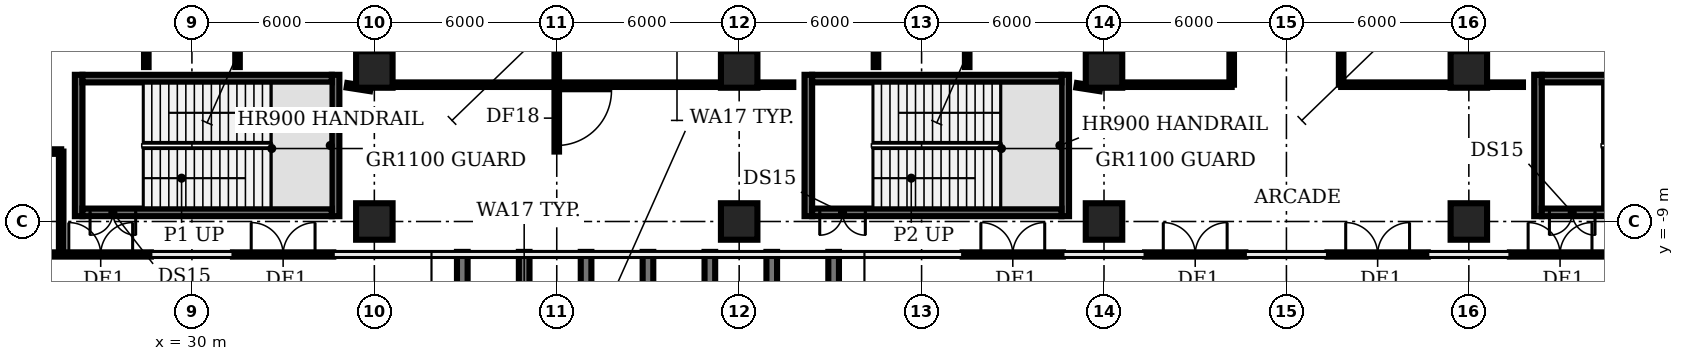
"""IFC4 building model, lengths in metres.
Left out: names, types, materials, properties, quantities, classifications, styles, units other than length and angle.
Written with IfcOpenShell. Run it as: python <this file> out.ifc"""

import sys

from ifc_helpers import new_model, si_unit, direction, frame, frame_2d, origin, origin_2d, place, context, subcontext, project, spatial, polyline, rectangle, outline, extrude, element, fill, save


model = new_model("IFC4")
c1 = context("Model", 3, precision=1e-05, world=origin(), true_north=direction((0.0, 1.0)))
c2 = subcontext(c1, "Body", "Model", "MODEL_VIEW")
j1 = project(units=[si_unit("LENGTHUNIT", "METRE"), si_unit("PLANEANGLEUNIT", "RADIAN")], contexts=[c1])
p1 = place(None, origin())
s1 = spatial("IfcSite", under=j1, at=p1, CompositionType="ELEMENT")
p2 = place(p1, origin())
s2 = spatial("IfcBuilding", under=s1, at=p2, CompositionType="ELEMENT")
p3 = place(p2, origin())
s3 = spatial("IfcBuildingStorey", under=s2, at=p3, CompositionType="ELEMENT", Elevation=0.0)
for number, where, z_axis, x_axis in (
    (1, (36.0, -9.0, 0.0), (0.0, 0.0, 1.0), (1.0, 0.0, 0.0)),
    (2, (36.0, -4.0, 0.0), (0.0, 0.0, 1.0), (1.0, 0.0, 0.0)),
    (3, (48.0, -9.0, 0.0), (0.0, 0.0, 1.0), (1.0, 0.0, 0.0)),
    (4, (48.0, -4.0, 0.0), (0.0, 0.0, 1.0), (1.0, 0.0, 0.0)),
    (5, (60.0, -9.0, 0.0), (0.0, 0.0, 1.0), (1.0, 0.0, 0.0)),
    (6, (60.0, -4.0, 0.0), (0.0, 0.0, 1.0), (1.0, 0.0, 0.0)),
    (7, (72.0, -9.0, 0.0), (0.0, 0.0, 1.0), (1.0, 0.0, 0.0)),
    (8, (72.0, -4.0, 0.0), (0.0, 0.0, 1.0), (1.0, 0.0, 0.0)),
):
    element("IfcColumn", number, at=place(p3, frame(where, z_axis=z_axis, x_axis=x_axis)), inside=s3, PredefinedType="COLUMN", context=c2, shape_type="SweptSolid", body=[
        extrude(rectangle(XDim=1.2, YDim=1.2, at=origin_2d()), origin(), (0.0, 0.0, 1.0), 5.65),
    ])
for number, where, z_axis, x_axis in (
    (9, (38.893, -16.7, 0.0), (0.0, 0.0, 1.0), (0.0, 1.0, 0.0)),
    (10, (40.929, -16.7, 0.0), (0.0, 0.0, 1.0), (0.0, 1.0, 0.0)),
    (11, (42.964, -16.7, 0.0), (0.0, 0.0, 1.0), (0.0, 1.0, 0.0)),
    (12, (45.0, -16.7, 0.0), (0.0, 0.0, 1.0), (0.0, 1.0, 0.0)),
    (13, (47.036, -16.7, 0.0), (0.0, 0.0, 1.0), (0.0, 1.0, 0.0)),
    (14, (49.071, -16.7, 0.0), (0.0, 0.0, 1.0), (0.0, 1.0, 0.0)),
    (15, (51.107, -16.7, 0.0), (0.0, 0.0, 1.0), (0.0, 1.0, 0.0)),
):
    element("IfcWall", number, at=place(p3, frame(where, z_axis=z_axis, x_axis=x_axis)), inside=s3, PredefinedType="SOLIDWALL", context=c2, shape_type="SweptSolid", body=[
        extrude(outline(polyline([(0.0, 0.0), (6.7, 0.0), (6.7, 10.647), (4.9, 10.647), (1.293, 8.5), (1.0, 8.5), (1.0, 8.147), (0.0, 8.147), (0.0, 0.0)])), frame((0.0, 0.175, 0.0), z_axis=(0.0, -1.0, 0.0), x_axis=(1.0, 0.0, 0.0)), (0.0, 0.0, 1.0), 0.35),
    ])
p4 = place(p3, frame((25.35, -10.085, 0.0), z_axis=(0.0, 0.0, 1.0), x_axis=(1.0, 0.0, 0.0)))
e16 = element("IfcWall", 16, at=p4, inside=s3, PredefinedType="SOLIDWALL", context=c2, shape_type="SweptSolid", body=[
    extrude(rectangle(XDim=3.3, YDim=0.14, at=frame_2d((1.65, 0.0))), origin(), (0.0, 0.0, 1.0), 5.65),
])
p5 = place(p4, frame((0.6, 0.0, 0.0)))
e17 = element("IfcOpeningElement", 17, at=p5, cuts=e16, PredefinedType="OPENING", context=c2, shape_type="SweptSolid", body=[
    extrude(rectangle(XDim=2.1, YDim=2.4, at=frame_2d((1.05, 1.2))), frame((0.0, 0.08, 0.0), z_axis=(0.0, -1.0, 0.0), x_axis=(1.0, 0.0, 0.0)), (0.0, 0.0, 1.0), 0.16),
])
p6 = place(p3, frame((31.35, -10.085, 0.0), z_axis=(0.0, 0.0, 1.0), x_axis=(1.0, 0.0, 0.0)))
e18 = element("IfcWall", 18, at=p6, inside=s3, PredefinedType="SOLIDWALL", context=c2, shape_type="SweptSolid", body=[
    extrude(rectangle(XDim=3.3, YDim=0.14, at=frame_2d((1.65, 0.0))), origin(), (0.0, 0.0, 1.0), 5.65),
])
p7 = place(p6, frame((0.6, 0.0, 0.0)))
e19 = element("IfcOpeningElement", 19, at=p7, cuts=e18, PredefinedType="OPENING", context=c2, shape_type="SweptSolid", body=[
    extrude(rectangle(XDim=2.1, YDim=2.4, at=frame_2d((1.05, 1.2))), frame((0.0, 0.08, 0.0), z_axis=(0.0, -1.0, 0.0), x_axis=(1.0, 0.0, 0.0)), (0.0, 0.0, 1.0), 0.16),
])
p8 = place(p3, frame((55.35, -10.085, 0.0), z_axis=(0.0, 0.0, 1.0), x_axis=(1.0, 0.0, 0.0)))
e20 = element("IfcWall", 20, at=p8, inside=s3, PredefinedType="SOLIDWALL", context=c2, shape_type="SweptSolid", body=[
    extrude(rectangle(XDim=3.3, YDim=0.14, at=frame_2d((1.65, 0.0))), origin(), (0.0, 0.0, 1.0), 5.65),
])
p9 = place(p8, frame((0.6, 0.0, 0.0)))
e21 = element("IfcOpeningElement", 21, at=p9, cuts=e20, PredefinedType="OPENING", context=c2, shape_type="SweptSolid", body=[
    extrude(rectangle(XDim=2.1, YDim=2.4, at=frame_2d((1.05, 1.2))), frame((0.0, 0.08, 0.0), z_axis=(0.0, -1.0, 0.0), x_axis=(1.0, 0.0, 0.0)), (0.0, 0.0, 1.0), 0.16),
])
p10 = place(p3, frame((61.35, -10.085, 0.0), z_axis=(0.0, 0.0, 1.0), x_axis=(1.0, 0.0, 0.0)))
e22 = element("IfcWall", 22, at=p10, inside=s3, PredefinedType="SOLIDWALL", context=c2, shape_type="SweptSolid", body=[
    extrude(rectangle(XDim=3.3, YDim=0.14, at=frame_2d((1.65, 0.0))), origin(), (0.0, 0.0, 1.0), 5.65),
])
p11 = place(p10, frame((0.6, 0.0, 0.0)))
e23 = element("IfcOpeningElement", 23, at=p11, cuts=e22, PredefinedType="OPENING", context=c2, shape_type="SweptSolid", body=[
    extrude(rectangle(XDim=2.1, YDim=2.4, at=frame_2d((1.05, 1.2))), frame((0.0, 0.08, 0.0), z_axis=(0.0, -1.0, 0.0), x_axis=(1.0, 0.0, 0.0)), (0.0, 0.0, 1.0), 0.16),
])
p12 = place(p3, frame((67.35, -10.085, 0.0), z_axis=(0.0, 0.0, 1.0), x_axis=(1.0, 0.0, 0.0)))
e24 = element("IfcWall", 24, at=p12, inside=s3, PredefinedType="SOLIDWALL", context=c2, shape_type="SweptSolid", body=[
    extrude(rectangle(XDim=3.3, YDim=0.14, at=frame_2d((1.65, 0.0))), origin(), (0.0, 0.0, 1.0), 5.65),
])
p13 = place(p12, frame((0.6, 0.0, 0.0)))
e25 = element("IfcOpeningElement", 25, at=p13, cuts=e24, PredefinedType="OPENING", context=c2, shape_type="SweptSolid", body=[
    extrude(rectangle(XDim=2.1, YDim=2.4, at=frame_2d((1.05, 1.2))), frame((0.0, 0.08, 0.0), z_axis=(0.0, -1.0, 0.0), x_axis=(1.0, 0.0, 0.0)), (0.0, 0.0, 1.0), 0.16),
])
p14 = place(p3, frame((73.35, -10.085, 0.0), z_axis=(0.0, 0.0, 1.0), x_axis=(1.0, 0.0, 0.0)))
e26 = element("IfcWall", 26, at=p14, inside=s3, PredefinedType="SOLIDWALL", context=c2, shape_type="SweptSolid", body=[
    extrude(rectangle(XDim=3.3, YDim=0.14, at=frame_2d((1.65, 0.0))), origin(), (0.0, 0.0, 1.0), 5.65),
])
p15 = place(p14, frame((0.6, 0.0, 0.0)))
e27 = element("IfcOpeningElement", 27, at=p15, cuts=e26, PredefinedType="OPENING", context=c2, shape_type="SweptSolid", body=[
    extrude(rectangle(XDim=2.1, YDim=2.4, at=frame_2d((1.05, 1.2))), frame((0.0, 0.08, 0.0), z_axis=(0.0, -1.0, 0.0), x_axis=(1.0, 0.0, 0.0)), (0.0, 0.0, 1.0), 0.16),
])
for number, where, z_axis, x_axis in (
    (28, (26.275, -8.825, 0.0), (0.0, 0.0, 1.0), (0.0, 1.0, 0.0)),
    (29, (34.725, -8.825, 0.0), (0.0, 0.0, 1.0), (0.0, 1.0, 0.0)),
):
    element("IfcWall", number, at=place(p3, frame(where, z_axis=z_axis, x_axis=x_axis)), inside=s3, PredefinedType="SHEAR", context=c2, shape_type="SweptSolid", body=[
        extrude(rectangle(XDim=4.65, YDim=0.25, at=frame_2d((2.325, 0.0))), origin(), (0.0, 0.0, 1.0), 5.65),
    ])
p16 = place(p3, frame((34.6, -8.7, 0.0), z_axis=(0.0, 0.0, 1.0), x_axis=(-1.0, 0.0, 0.0)))
e30 = element("IfcWall", 30, at=p16, inside=s3, PredefinedType="SHEAR", context=c2, shape_type="SweptSolid", body=[
    extrude(rectangle(XDim=8.2, YDim=0.25, at=frame_2d((4.1, 0.0))), origin(), (0.0, 0.0, 1.0), 5.65),
])
p17 = place(p16, frame((6.45, 0.0, 0.0)))
e31 = element("IfcOpeningElement", 31, at=p17, cuts=e30, PredefinedType="OPENING", context=c2, shape_type="SweptSolid", body=[
    extrude(rectangle(XDim=1.5, YDim=2.1, at=frame_2d((0.75, 1.05))), frame((0.0, 0.135, 0.0), z_axis=(0.0, -1.0, 0.0), x_axis=(1.0, 0.0, 0.0)), (0.0, 0.0, 1.0), 0.27),
])
p18 = place(p3, frame((26.4, -4.3, 0.0), z_axis=(0.0, 0.0, 1.0), x_axis=(1.0, 0.0, 0.0)))
e32 = element("IfcWall", 32, at=p18, inside=s3, PredefinedType="SHEAR", context=c2, shape_type="SweptSolid", body=[
    extrude(rectangle(XDim=8.2, YDim=0.25, at=frame_2d((4.1, 0.0))), origin(), (0.0, 0.0, 1.0), 5.65),
])
for number, where, z_axis, x_axis in (
    (33, (50.275, -8.825, 0.0), (0.0, 0.0, 1.0), (0.0, 1.0, 0.0)),
    (34, (58.725, -8.825, 0.0), (0.0, 0.0, 1.0), (0.0, 1.0, 0.0)),
):
    element("IfcWall", number, at=place(p3, frame(where, z_axis=z_axis, x_axis=x_axis)), inside=s3, PredefinedType="SHEAR", context=c2, shape_type="SweptSolid", body=[
        extrude(rectangle(XDim=4.65, YDim=0.25, at=frame_2d((2.325, 0.0))), origin(), (0.0, 0.0, 1.0), 5.65),
    ])
p19 = place(p3, frame((58.6, -8.7, 0.0), z_axis=(0.0, 0.0, 1.0), x_axis=(-1.0, 0.0, 0.0)))
e35 = element("IfcWall", 35, at=p19, inside=s3, PredefinedType="SHEAR", context=c2, shape_type="SweptSolid", body=[
    extrude(rectangle(XDim=8.2, YDim=0.25, at=frame_2d((4.1, 0.0))), origin(), (0.0, 0.0, 1.0), 5.65),
])
p20 = place(p19, frame((6.45, 0.0, 0.0)))
e36 = element("IfcOpeningElement", 36, at=p20, cuts=e35, PredefinedType="OPENING", context=c2, shape_type="SweptSolid", body=[
    extrude(rectangle(XDim=1.5, YDim=2.1, at=frame_2d((0.75, 1.05))), frame((0.0, 0.135, 0.0), z_axis=(0.0, -1.0, 0.0), x_axis=(1.0, 0.0, 0.0)), (0.0, 0.0, 1.0), 0.27),
])
p21 = place(p3, frame((50.4, -4.3, 0.0), z_axis=(0.0, 0.0, 1.0), x_axis=(1.0, 0.0, 0.0)))
e37 = element("IfcWall", 37, at=p21, inside=s3, PredefinedType="SHEAR", context=c2, shape_type="SweptSolid", body=[
    extrude(rectangle(XDim=8.2, YDim=0.25, at=frame_2d((4.1, 0.0))), origin(), (0.0, 0.0, 1.0), 5.65),
])
p22 = place(p3, frame((74.275, -8.825, 0.0), z_axis=(0.0, 0.0, 1.0), x_axis=(0.0, 1.0, 0.0)))
e38 = element("IfcWall", 38, at=p22, inside=s3, PredefinedType="SHEAR", context=c2, shape_type="SweptSolid", body=[
    extrude(rectangle(XDim=4.65, YDim=0.25, at=frame_2d((2.325, 0.0))), origin(), (0.0, 0.0, 1.0), 5.65),
])
p23 = place(p3, frame((82.6, -8.7, 0.0), z_axis=(0.0, 0.0, 1.0), x_axis=(-1.0, 0.0, 0.0)))
e39 = element("IfcWall", 39, at=p23, inside=s3, PredefinedType="SHEAR", context=c2, shape_type="SweptSolid", body=[
    extrude(rectangle(XDim=8.2, YDim=0.25, at=frame_2d((4.1, 0.0))), origin(), (0.0, 0.0, 1.0), 5.65),
])
p24 = place(p23, frame((6.45, 0.0, 0.0)))
e40 = element("IfcOpeningElement", 40, at=p24, cuts=e39, PredefinedType="OPENING", context=c2, shape_type="SweptSolid", body=[
    extrude(rectangle(XDim=1.5, YDim=2.1, at=frame_2d((0.75, 1.05))), frame((0.0, 0.135, 0.0), z_axis=(0.0, -1.0, 0.0), x_axis=(1.0, 0.0, 0.0)), (0.0, 0.0, 1.0), 0.27),
])
p25 = place(p3, frame((74.4, -4.3, 0.0), z_axis=(0.0, 0.0, 1.0), x_axis=(1.0, 0.0, 0.0)))
e41 = element("IfcWall", 41, at=p25, inside=s3, PredefinedType="SHEAR", context=c2, shape_type="SweptSolid", body=[
    extrude(rectangle(XDim=8.2, YDim=0.25, at=frame_2d((4.1, 0.0))), origin(), (0.0, 0.0, 1.0), 5.65),
])
p26 = place(p3, frame((23.43, -6.7, 0.0), z_axis=(0.0, 0.0, 1.0), x_axis=(1.0, 0.0, 0.0)))
e42 = element("IfcWall", 42, at=p26, inside=s3, PredefinedType="PARTITIONING", context=c2, shape_type="SweptSolid", body=[
    extrude(rectangle(XDim=2.27, YDim=0.15, at=frame_2d((1.135, 0.0))), origin(), (0.0, 0.0, 1.0), 4.53),
])
p27 = place(p3, frame((25.7, -10.03, 0.0), z_axis=(0.0, 0.0, 1.0), x_axis=(0.0, 1.0, 0.0)))
e43 = element("IfcWall", 43, at=p27, inside=s3, PredefinedType="PARTITIONING", context=c2, shape_type="SweptSolid", body=[
    extrude(rectangle(XDim=3.33, YDim=0.15, at=frame_2d((1.665, 0.0))), origin(), (0.0, 0.0, 1.0), 4.53),
])
p28 = place(p3, frame((28.5, -3.92, 0.0), z_axis=(0.0, 0.0, 1.0), x_axis=(0.0, 1.0, 0.0)))
e44 = element("IfcWall", 44, at=p28, inside=s3, PredefinedType="PARTITIONING", context=c2, shape_type="SweptSolid", body=[
    extrude(rectangle(XDim=4.74, YDim=0.15, at=frame_2d((2.37, 0.0))), origin(), (0.0, 0.0, 1.0), 4.53),
])
p29 = place(p28, frame((1.84, 0.0, 0.0)))
e45 = element("IfcOpeningElement", 45, at=p29, cuts=e44, PredefinedType="OPENING", context=c2, shape_type="SweptSolid", body=[
    extrude(rectangle(XDim=1.2, YDim=2.1, at=frame_2d((0.6, 1.05))), frame((0.0, 0.085, 0.0), z_axis=(0.0, -1.0, 0.0), x_axis=(1.0, 0.0, 0.0)), (0.0, 0.0, 1.0), 0.17),
])
p30 = place(p3, frame((31.5, 19.52, 0.0), z_axis=(0.0, 0.0, 1.0), x_axis=(0.0, -1.0, 0.0)))
e46 = element("IfcWall", 46, at=p30, inside=s3, PredefinedType="PARTITIONING", context=c2, shape_type="SweptSolid", body=[
    extrude(rectangle(XDim=23.44, YDim=0.15, at=frame_2d((11.72, 0.0))), origin(), (0.0, 0.0, 1.0), 4.53),
])
p31 = place(p30, frame((11.14, 0.0, 0.0)))
e47 = element("IfcOpeningElement", 47, at=p31, cuts=e46, PredefinedType="OPENING", context=c2, shape_type="SweptSolid", body=[
    extrude(rectangle(XDim=1.0, YDim=2.1, at=frame_2d((0.5, 1.05))), frame((0.0, 0.085, 0.0), z_axis=(0.0, -1.0, 0.0), x_axis=(1.0, 0.0, 0.0)), (0.0, 0.0, 1.0), 0.17),
])
p32 = place(p3, frame((35.1, -4.52, 0.0), z_axis=(0.0, 0.0, 1.0), x_axis=(0.988098486873, -0.153822560892, 0.0)))
e48 = element("IfcWall", 48, at=p32, inside=s3, PredefinedType="PARTITIONING", context=c2, shape_type="SweptSolid", body=[
    extrude(rectangle(XDim=0.779, YDim=0.15, at=frame_2d((0.39, 0.0))), origin(), (0.0, 0.0, 1.0), 4.53),
])
p33 = place(p3, frame((36.46, -4.5, 0.0), z_axis=(0.0, 0.0, 1.0), x_axis=(1.0, 0.0, 0.0)))
e49 = element("IfcWall", 49, at=p33, inside=s3, PredefinedType="PARTITIONING", context=c2, shape_type="SweptSolid", body=[
    extrude(rectangle(XDim=11.08, YDim=0.15, at=frame_2d((5.54, 0.0))), origin(), (0.0, 0.0, 1.0), 4.53),
])
p34 = place(p3, frame((42.0, -4.5, 0.0), z_axis=(0.0, 0.0, 1.0), x_axis=(0.0, -1.0, 0.0)))
e50 = element("IfcWall", 50, at=p34, inside=s3, PredefinedType="PARTITIONING", context=c2, shape_type="SweptSolid", body=[
    extrude(rectangle(XDim=2.2, YDim=0.15, at=frame_2d((1.1, 0.0))), origin(), (0.0, 0.0, 1.0), 4.53),
])
p35 = place(p34, frame((0.2, 0.0, 0.0)))
e51 = element("IfcOpeningElement", 51, at=p35, cuts=e50, PredefinedType="OPENING", context=c2, shape_type="SweptSolid", body=[
    extrude(rectangle(XDim=1.8, YDim=2.1, at=frame_2d((0.9, 1.05))), frame((0.0, 0.085, 0.0), z_axis=(0.0, -1.0, 0.0), x_axis=(1.0, 0.0, 0.0)), (0.0, 0.0, 1.0), 0.17),
])
p36 = place(p3, frame((42.0, -4.5, 0.0), z_axis=(0.0, 0.0, 1.0), x_axis=(0.0, 1.0, 0.0)))
e52 = element("IfcWall", 52, at=p36, inside=s3, PredefinedType="PARTITIONING", context=c2, shape_type="SweptSolid", body=[
    extrude(rectangle(XDim=32.4, YDim=0.15, at=frame_2d((16.2, 0.0))), origin(), (0.0, 0.0, 1.0), 4.53),
])
p37 = place(p3, frame((48.46, -4.5, 0.0), z_axis=(0.0, 0.0, 1.0), x_axis=(1.0, 0.0, 0.0)))
e53 = element("IfcWall", 53, at=p37, inside=s3, PredefinedType="PARTITIONING", context=c2, shape_type="SweptSolid", body=[
    extrude(rectangle(XDim=1.32, YDim=0.15, at=frame_2d((0.66, 0.0))), origin(), (0.0, 0.0, 1.0), 4.53),
])
p38 = place(p3, frame((52.5, 27.9, 0.0), z_axis=(0.0, 0.0, 1.0), x_axis=(0.0, -1.0, 0.0)))
e54 = element("IfcWall", 54, at=p38, inside=s3, PredefinedType="PARTITIONING", context=c2, shape_type="SweptSolid", body=[
    extrude(rectangle(XDim=31.82, YDim=0.15, at=frame_2d((15.91, 0.0))), origin(), (0.0, 0.0, 1.0), 4.53),
])
p39 = place(p38, frame((14.9, 0.0, 0.0)))
e55 = element("IfcOpeningElement", 55, at=p39, cuts=e54, PredefinedType="OPENING", context=c2, shape_type="SweptSolid", body=[
    extrude(rectangle(XDim=1.8, YDim=2.1, at=frame_2d((0.9, 1.05))), frame((0.0, 0.085, 0.0), z_axis=(0.0, -1.0, 0.0), x_axis=(1.0, 0.0, 0.0)), (0.0, 0.0, 1.0), 0.17),
])
p40 = place(p3, frame((55.5, 6.57, 0.0), z_axis=(0.0, 0.0, 1.0), x_axis=(0.0, -1.0, 0.0)))
e56 = element("IfcWall", 56, at=p40, inside=s3, PredefinedType="PARTITIONING", context=c2, shape_type="SweptSolid", body=[
    extrude(rectangle(XDim=10.49, YDim=0.15, at=frame_2d((5.245, 0.0))), origin(), (0.0, 0.0, 1.0), 4.53),
])
p41 = place(p40, frame((4.59, 0.0, 0.0)))
e57 = element("IfcOpeningElement", 57, at=p41, cuts=e56, PredefinedType="OPENING", context=c2, shape_type="SweptSolid", body=[
    extrude(rectangle(XDim=1.2, YDim=2.1, at=frame_2d((0.6, 1.05))), frame((0.0, 0.085, 0.0), z_axis=(0.0, -1.0, 0.0), x_axis=(1.0, 0.0, 0.0)), (0.0, 0.0, 1.0), 0.17),
])
p42 = place(p3, frame((59.1, -4.52, 0.0), z_axis=(0.0, 0.0, 1.0), x_axis=(0.988098486873, -0.153822560892, 0.0)))
e58 = element("IfcWall", 58, at=p42, inside=s3, PredefinedType="PARTITIONING", context=c2, shape_type="SweptSolid", body=[
    extrude(rectangle(XDim=0.779, YDim=0.15, at=frame_2d((0.39, 0.0))), origin(), (0.0, 0.0, 1.0), 4.53),
])
p43 = place(p3, frame((60.46, -4.5, 0.0), z_axis=(0.0, 0.0, 1.0), x_axis=(1.0, 0.0, 0.0)))
e59 = element("IfcWall", 59, at=p43, inside=s3, PredefinedType="PARTITIONING", context=c2, shape_type="SweptSolid", body=[
    extrude(rectangle(XDim=3.74, YDim=0.15, at=frame_2d((1.87, 0.0))), origin(), (0.0, 0.0, 1.0), 4.53),
])
p44 = place(p3, frame((64.2, -4.5, 0.0), z_axis=(0.0, 0.0, 1.0), x_axis=(0.0, 1.0, 0.0)))
e60 = element("IfcWall", 60, at=p44, inside=s3, PredefinedType="PARTITIONING", context=c2, shape_type="SweptSolid", body=[
    extrude(rectangle(XDim=26.04, YDim=0.15, at=frame_2d((13.02, 0.0))), origin(), (0.0, 0.0, 1.0), 4.53),
])
p45 = place(p3, frame((67.8, -4.5, 0.0), z_axis=(0.0, 0.0, 1.0), x_axis=(0.0, 1.0, 0.0)))
e61 = element("IfcWall", 61, at=p45, inside=s3, PredefinedType="PARTITIONING", context=c2, shape_type="SweptSolid", body=[
    extrude(rectangle(XDim=8.79, YDim=0.15, at=frame_2d((4.395, 0.0))), origin(), (0.0, 0.0, 1.0), 4.53),
])
p46 = place(p3, frame((67.8, -4.5, 0.0), z_axis=(0.0, 0.0, 1.0), x_axis=(1.0, 0.0, 0.0)))
e62 = element("IfcWall", 62, at=p46, inside=s3, PredefinedType="PARTITIONING", context=c2, shape_type="SweptSolid", body=[
    extrude(rectangle(XDim=3.74, YDim=0.15, at=frame_2d((1.87, 0.0))), origin(), (0.0, 0.0, 1.0), 4.53),
])
p47 = place(p3, frame((72.46, -4.5, 0.0), z_axis=(0.0, 0.0, 1.0), x_axis=(1.0, 0.0, 0.0)))
e63 = element("IfcWall", 63, at=p47, inside=s3, PredefinedType="PARTITIONING", context=c2, shape_type="SweptSolid", body=[
    extrude(rectangle(XDim=1.32, YDim=0.15, at=frame_2d((0.66, 0.0))), origin(), (0.0, 0.0, 1.0), 4.53),
])
p48 = place(p5, origin())
e64 = element("IfcDoor", 64, at=p48, inside=s3, OperationType="DOUBLE_DOOR_DOUBLE_SWING", PredefinedType="DOOR", context=c2, shape_type="SweptSolid", body=[
    extrude(rectangle(XDim=2.1, YDim=2.4, at=frame_2d((1.05, 1.2))), frame((0.0, 0.025, 0.0), z_axis=(0.0, -1.0, 0.0), x_axis=(1.0, 0.0, 0.0)), (0.0, 0.0, 1.0), 0.05),
])
fill(e17, e64)
p49 = place(p7, origin())
e65 = element("IfcDoor", 65, at=p49, inside=s3, OperationType="DOUBLE_DOOR_DOUBLE_SWING", PredefinedType="DOOR", context=c2, shape_type="SweptSolid", body=[
    extrude(rectangle(XDim=2.1, YDim=2.4, at=frame_2d((1.05, 1.2))), frame((0.0, 0.025, 0.0), z_axis=(0.0, -1.0, 0.0), x_axis=(1.0, 0.0, 0.0)), (0.0, 0.0, 1.0), 0.05),
])
fill(e19, e65)
p50 = place(p9, origin())
e66 = element("IfcDoor", 66, at=p50, inside=s3, OperationType="DOUBLE_DOOR_DOUBLE_SWING", PredefinedType="DOOR", context=c2, shape_type="SweptSolid", body=[
    extrude(rectangle(XDim=2.1, YDim=2.4, at=frame_2d((1.05, 1.2))), frame((0.0, 0.025, 0.0), z_axis=(0.0, -1.0, 0.0), x_axis=(1.0, 0.0, 0.0)), (0.0, 0.0, 1.0), 0.05),
])
fill(e21, e66)
p51 = place(p11, origin())
e67 = element("IfcDoor", 67, at=p51, inside=s3, OperationType="DOUBLE_DOOR_DOUBLE_SWING", PredefinedType="DOOR", context=c2, shape_type="SweptSolid", body=[
    extrude(rectangle(XDim=2.1, YDim=2.4, at=frame_2d((1.05, 1.2))), frame((0.0, 0.025, 0.0), z_axis=(0.0, -1.0, 0.0), x_axis=(1.0, 0.0, 0.0)), (0.0, 0.0, 1.0), 0.05),
])
fill(e23, e67)
p52 = place(p13, origin())
e68 = element("IfcDoor", 68, at=p52, inside=s3, OperationType="DOUBLE_DOOR_DOUBLE_SWING", PredefinedType="DOOR", context=c2, shape_type="SweptSolid", body=[
    extrude(rectangle(XDim=2.1, YDim=2.4, at=frame_2d((1.05, 1.2))), frame((0.0, 0.025, 0.0), z_axis=(0.0, -1.0, 0.0), x_axis=(1.0, 0.0, 0.0)), (0.0, 0.0, 1.0), 0.05),
])
fill(e25, e68)
p53 = place(p15, origin())
e69 = element("IfcDoor", 69, at=p53, inside=s3, OperationType="DOUBLE_DOOR_DOUBLE_SWING", PredefinedType="DOOR", context=c2, shape_type="SweptSolid", body=[
    extrude(rectangle(XDim=2.1, YDim=2.4, at=frame_2d((1.05, 1.2))), frame((0.0, 0.025, 0.0), z_axis=(0.0, -1.0, 0.0), x_axis=(1.0, 0.0, 0.0)), (0.0, 0.0, 1.0), 0.05),
])
fill(e27, e69)
p54 = place(p17, origin())
e70 = element("IfcDoor", 70, at=p54, inside=s3, OperationType="DOUBLE_DOOR_SINGLE_SWING", PredefinedType="DOOR", context=c2, shape_type="SweptSolid", body=[
    extrude(rectangle(XDim=1.5, YDim=2.1, at=frame_2d((0.75, 1.05))), frame((0.0, 0.025, 0.0), z_axis=(0.0, -1.0, 0.0), x_axis=(1.0, 0.0, 0.0)), (0.0, 0.0, 1.0), 0.05),
])
fill(e31, e70)
p55 = place(p20, origin())
e71 = element("IfcDoor", 71, at=p55, inside=s3, OperationType="DOUBLE_DOOR_SINGLE_SWING", PredefinedType="DOOR", context=c2, shape_type="SweptSolid", body=[
    extrude(rectangle(XDim=1.5, YDim=2.1, at=frame_2d((0.75, 1.05))), frame((0.0, 0.025, 0.0), z_axis=(0.0, -1.0, 0.0), x_axis=(1.0, 0.0, 0.0)), (0.0, 0.0, 1.0), 0.05),
])
fill(e36, e71)
p56 = place(p24, origin())
e72 = element("IfcDoor", 72, at=p56, inside=s3, OperationType="DOUBLE_DOOR_SINGLE_SWING", PredefinedType="DOOR", context=c2, shape_type="SweptSolid", body=[
    extrude(rectangle(XDim=1.5, YDim=2.1, at=frame_2d((0.75, 1.05))), frame((0.0, 0.025, 0.0), z_axis=(0.0, -1.0, 0.0), x_axis=(1.0, 0.0, 0.0)), (0.0, 0.0, 1.0), 0.05),
])
fill(e40, e72)
p57 = place(p35, origin())
e73 = element("IfcDoor", 73, at=p57, inside=s3, OperationType="SINGLE_SWING_LEFT", PredefinedType="DOOR", context=c2, shape_type="SweptSolid", body=[
    extrude(rectangle(XDim=1.8, YDim=2.1, at=frame_2d((0.9, 1.05))), frame((0.0, 0.025, 0.0), z_axis=(0.0, -1.0, 0.0), x_axis=(1.0, 0.0, 0.0)), (0.0, 0.0, 1.0), 0.05),
])
fill(e51, e73)
save(model, sys.argv[1])
